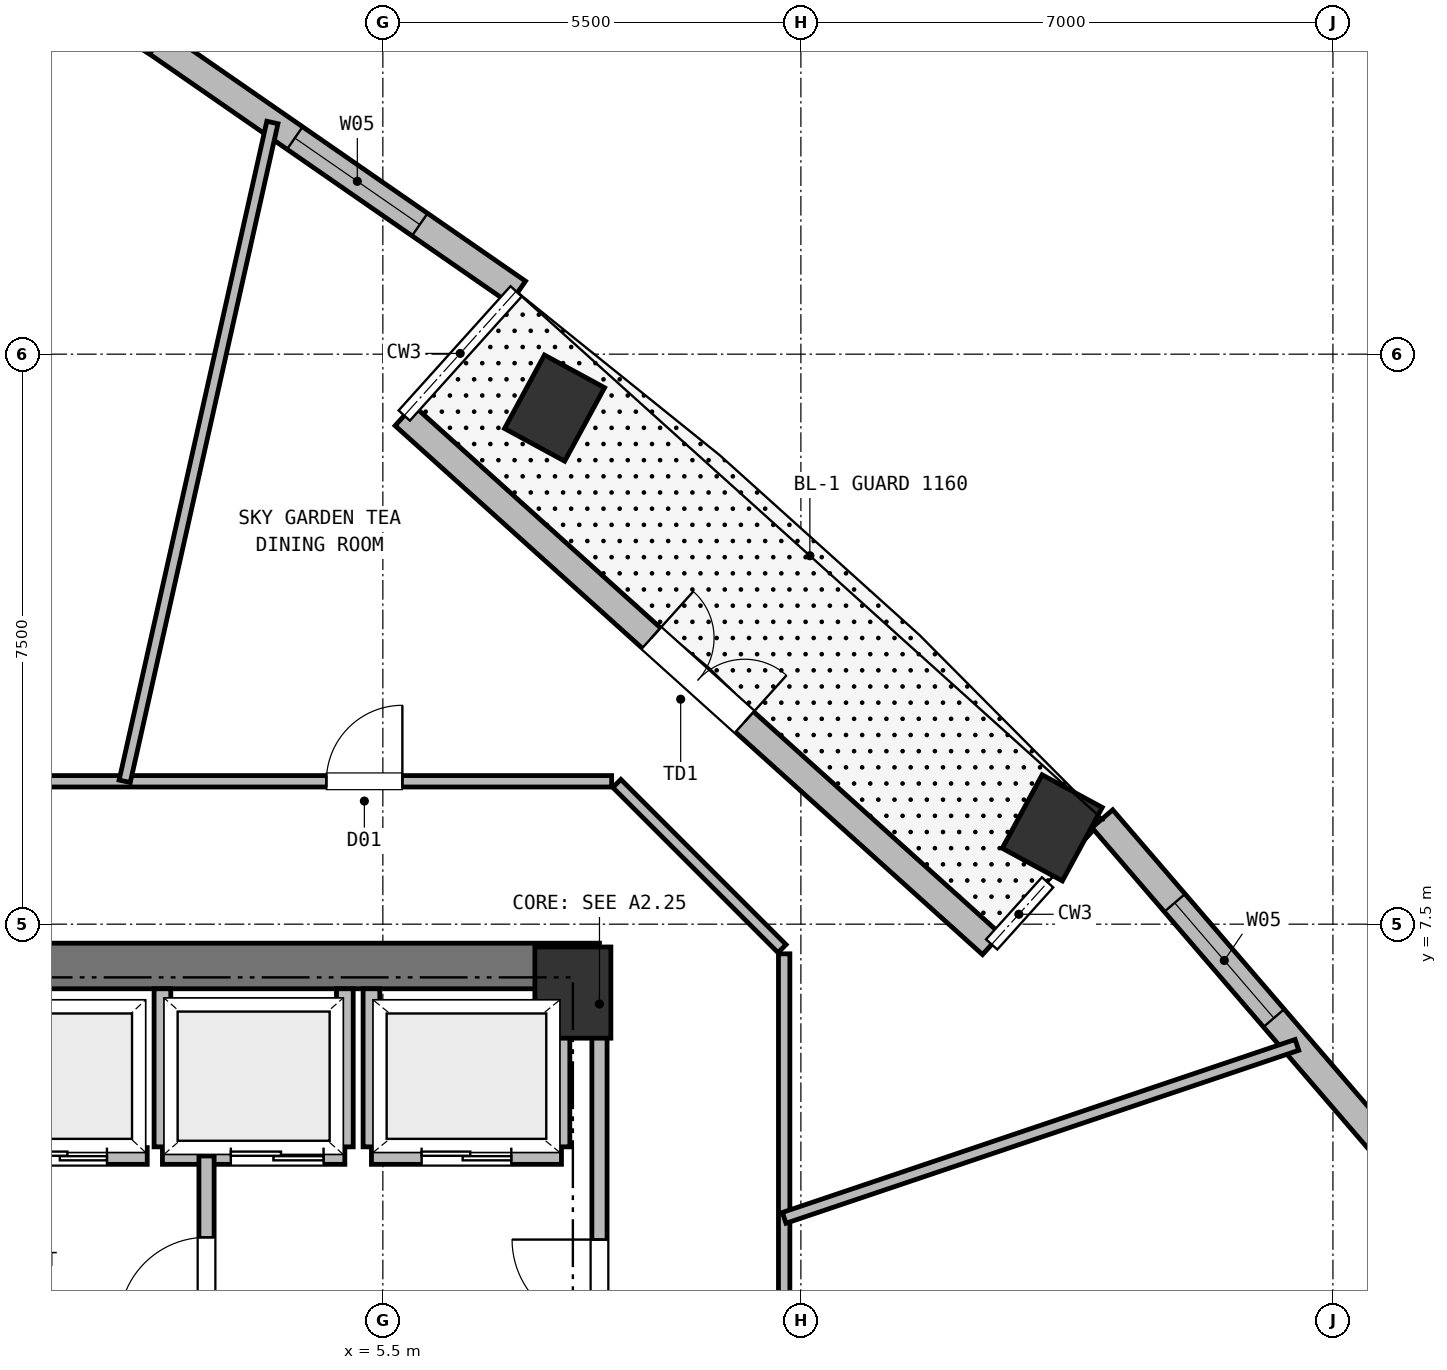
"""IFC4 building model, lengths in metres.
Left out: names, types, materials, properties, quantities, classifications, styles, units other than length and angle.
Written with IfcOpenShell. Run it as: python <this file> out.ifc"""

import sys

from ifc_helpers import new_model, si_unit, direction, frame, frame_2d, origin, origin_2d, place, context, subcontext, project, spatial, rectangle, extrude, element, fill, save


model = new_model("IFC4")
c1 = context("Model", 3, precision=1e-05, world=origin(), true_north=direction((0.0, 1.0)))
c2 = subcontext(c1, "Body", "Model", "MODEL_VIEW")
j1 = project(units=[si_unit("LENGTHUNIT", "METRE"), si_unit("PLANEANGLEUNIT", "RADIAN")], contexts=[c1])
p1 = place(None, origin())
s1 = spatial("IfcSite", under=j1, at=p1, CompositionType="ELEMENT")
p2 = place(p1, origin())
s2 = spatial("IfcBuilding", under=s1, at=p2, CompositionType="ELEMENT")
p3 = place(p2, frame((0.0, 0.0, 88.25)))
s3 = spatial("IfcBuildingStorey", under=s2, at=p3, CompositionType="ELEMENT", Elevation=88.25)
p4 = place(p3, frame((8.0, 6.6, 0.0), z_axis=(0.0, 0.0, 1.0), x_axis=(1.0, 0.0, 0.0)))
e1 = element("IfcColumn", 1, at=p4, inside=s3, PredefinedType="COLUMN", context=c2, shape_type="SweptSolid", body=[
    extrude(rectangle(XDim=1.0, YDim=1.2, at=origin_2d()), origin(), (0.0, 0.0, 1.0), 4.5),
])
p5 = place(p3, frame((-8.35, 6.95, 0.0), z_axis=(0.0, 0.0, 1.0), x_axis=(1.0, 0.0, 0.0)))
e2 = element("IfcWall", 2, at=p5, inside=s3, PredefinedType="SHEAR", context=c2, shape_type="SweptSolid", body=[
    extrude(rectangle(XDim=16.7, YDim=0.6, at=frame_2d((8.35, 0.0))), origin(), (0.0, 0.0, 1.0), 4.21),
])
for number, where, z_axis, x_axis in (
    (3, (14.307, 8.767, 0.0), (0.0, 0.0, 1.0), (-0.879, 0.477, 0.0)),
    (4, (7.759, 14.29, 0.0), (0.0, 0.0, 1.0), (-0.879, 0.477, 0.0)),
):
    element("IfcColumn", number, at=place(p3, frame(where, z_axis=z_axis, x_axis=x_axis)), inside=s3, PredefinedType="COLUMN", context=c2, shape_type="SweptSolid", body=[
        extrude(rectangle(XDim=0.9, YDim=1.1, at=origin_2d()), origin(), (0.0, 0.0, 1.0), 4.5),
    ])
p6 = place(p3, frame((5.781, 14.192, 0.0), z_axis=(0.0, 0.0, 1.0), x_axis=(0.743145885754, -0.6691294288, 0.0)))
e5 = element("IfcWall", 5, at=p6, inside=s3, PredefinedType="SOLIDWALL", context=c2, shape_type="SweptSolid", body=[
    extrude(rectangle(XDim=10.4, YDim=0.36, at=frame_2d((5.2, 0.0))), origin(), (0.0, 0.0, 1.0), 4.21),
])
p7 = place(p6, frame((4.375, 0.0, 0.0)))
e6 = element("IfcOpeningElement", 6, at=p7, cuts=e5, PredefinedType="OPENING", context=c2, shape_type="SweptSolid", body=[
    extrude(rectangle(XDim=1.65, YDim=2.25, at=frame_2d((0.825, 1.125))), frame((0.0, 0.19, 0.0), z_axis=(0.0, -1.0, 0.0), x_axis=(1.0, 0.0, 0.0)), (0.0, 0.0, 1.0), 0.38),
])
p8 = place(p3, frame((14.966, 8.887, 0.0), z_axis=(0.0, 0.0, 1.0), x_axis=(0.65220496226, -0.758042668458, 0.0)))
e7 = element("IfcWall", 7, at=p8, inside=s3, PredefinedType="SOLIDWALL", context=c2, shape_type="SweptSolid", body=[
    extrude(rectangle(XDim=5.827, YDim=0.36, at=frame_2d((2.914, 0.0))), origin(), (0.0, 0.0, 1.0), 4.21),
])
p9 = place(p8, frame((1.46, 0.0, 0.72)))
e8 = element("IfcOpeningElement", 8, at=p9, cuts=e7, PredefinedType="OPENING", context=c2, shape_type="SweptSolid", body=[
    extrude(rectangle(XDim=2.0, YDim=2.15, at=frame_2d((1.0, 1.075))), frame((0.0, 0.19, 0.0), z_axis=(0.0, -1.0, 0.0), x_axis=(1.0, 0.0, 0.0)), (0.0, 0.0, 1.0), 0.38),
])
p10 = place(p3, frame((2.484, 19.131, 0.0), z_axis=(0.0, 0.0, 1.0), x_axis=(0.82210319234, -0.56933851191, 0.0)))
e9 = element("IfcWall", 9, at=p10, inside=s3, PredefinedType="SOLIDWALL", context=c2, shape_type="SweptSolid", body=[
    extrude(rectangle(XDim=5.827, YDim=0.36, at=frame_2d((2.914, 0.0))), origin(), (0.0, 0.0, 1.0), 4.21),
])
p11 = place(p10, frame((2.26, 0.0, 0.72)))
e10 = element("IfcOpeningElement", 10, at=p11, cuts=e9, PredefinedType="OPENING", context=c2, shape_type="SweptSolid", body=[
    extrude(rectangle(XDim=2.0, YDim=2.15, at=frame_2d((1.0, 1.075))), frame((0.0, 0.19, 0.0), z_axis=(0.0, -1.0, 0.0), x_axis=(1.0, 0.0, 0.0)), (0.0, 0.0, 1.0), 0.38),
])
p12 = place(p3, frame((0.238, 20.48, 0.0), z_axis=(0.0, 0.0, 1.0), x_axis=(0.856887148216, -0.515504039967, 0.0)))
e11 = element("IfcWall", 11, at=p12, inside=s3, PredefinedType="SOLIDWALL", context=c2, shape_type="SweptSolid", body=[
    extrude(rectangle(XDim=2.67, YDim=0.36, at=frame_2d((1.335, 0.0))), origin(), (0.0, 0.0, 1.0), 4.21),
])
p13 = place(p12, frame((0.335, 0.0, 0.72)))
e12 = element("IfcOpeningElement", 12, at=p13, cuts=e11, PredefinedType="OPENING", context=c2, shape_type="SweptSolid", body=[
    extrude(rectangle(XDim=2.0, YDim=2.15, at=frame_2d((1.0, 1.075))), frame((0.0, 0.19, 0.0), z_axis=(0.0, -1.0, 0.0), x_axis=(1.0, 0.0, 0.0)), (0.0, 0.0, 1.0), 0.38),
])
p14 = place(p3, frame((5.35, 4.45, 0.0), z_axis=(0.0, 0.0, 1.0), x_axis=(1.0, 0.0, 0.0)))
e13 = element("IfcWall", 13, at=p14, inside=s3, PredefinedType="PARTITIONING", context=c2, shape_type="SweptSolid", body=[
    extrude(rectangle(XDim=2.5, YDim=0.22, at=frame_2d((1.25, 0.0))), origin(), (0.0, 0.0, 1.0), 4.21),
])
p15 = place(p14, frame((0.66, 0.0, 0.0)))
e14 = element("IfcOpeningElement", 14, at=p15, cuts=e13, PredefinedType="OPENING", context=c2, shape_type="SweptSolid", body=[
    extrude(rectangle(XDim=1.18, YDim=2.15, at=frame_2d((0.59, 1.075))), frame((0.0, 0.12, 0.0), z_axis=(0.0, -1.0, 0.0), x_axis=(1.0, 0.0, 0.0)), (0.0, 0.0, 1.0), 0.24),
])
p16 = place(p3, frame((5.35, 4.57, 0.0), z_axis=(0.0, 0.0, 1.0), x_axis=(0.0, 1.0, 0.0)))
e15 = element("IfcWall", 15, at=p16, inside=s3, PredefinedType="PARTITIONING", context=c2, shape_type="SweptSolid", body=[
    extrude(rectangle(XDim=2.08, YDim=0.22, at=frame_2d((1.04, 0.0))), origin(), (0.0, 0.0, 1.0), 4.21),
])
p17 = place(p3, frame((7.85, 4.57, 0.0), z_axis=(0.0, 0.0, 1.0), x_axis=(0.0, 1.0, 0.0)))
e16 = element("IfcWall", 16, at=p17, inside=s3, PredefinedType="PARTITIONING", context=c2, shape_type="SweptSolid", body=[
    extrude(rectangle(XDim=2.08, YDim=0.22, at=frame_2d((1.04, 0.0))), origin(), (0.0, 0.0, 1.0), 3.83),
])
p18 = place(p3, frame((2.6, 4.45, 0.0), z_axis=(0.0, 0.0, 1.0), x_axis=(1.0, 0.0, 0.0)))
e17 = element("IfcWall", 17, at=p18, inside=s3, PredefinedType="PARTITIONING", context=c2, shape_type="SweptSolid", body=[
    extrude(rectangle(XDim=2.4, YDim=0.22, at=frame_2d((1.2, 0.0))), origin(), (0.0, 0.0, 1.0), 4.21),
])
p19 = place(p18, frame((0.9, 0.0, 0.0)))
e18 = element("IfcOpeningElement", 18, at=p19, cuts=e17, PredefinedType="OPENING", context=c2, shape_type="SweptSolid", body=[
    extrude(rectangle(XDim=1.22, YDim=2.15, at=frame_2d((0.61, 1.075))), frame((0.0, 0.12, 0.0), z_axis=(0.0, -1.0, 0.0), x_axis=(1.0, 0.0, 0.0)), (0.0, 0.0, 1.0), 0.24),
])
for number, where, z_axis, x_axis in (
    (19, (2.6, 4.57, 0.0), (0.0, 0.0, 1.0), (0.0, 1.0, 0.0)),
    (20, (5.0, 4.57, 0.0), (0.0, 0.0, 1.0), (0.0, 1.0, 0.0)),
):
    element("IfcWall", number, at=place(p3, frame(where, z_axis=z_axis, x_axis=x_axis)), inside=s3, PredefinedType="PARTITIONING", context=c2, shape_type="SweptSolid", body=[
        extrude(rectangle(XDim=2.08, YDim=0.22, at=frame_2d((1.04, 0.0))), origin(), (0.0, 0.0, 1.0), 4.21),
    ])
p20 = place(p3, frame((0.2, 4.45, 0.0), z_axis=(0.0, 0.0, 1.0), x_axis=(1.0, 0.0, 0.0)))
e21 = element("IfcWall", 21, at=p20, inside=s3, PredefinedType="PARTITIONING", context=c2, shape_type="SweptSolid", body=[
    extrude(rectangle(XDim=2.2, YDim=0.22, at=frame_2d((1.1, 0.0))), origin(), (0.0, 0.0, 1.0), 4.21),
])
p21 = place(p20, frame((0.53, 0.0, 0.0)))
e22 = element("IfcOpeningElement", 22, at=p21, cuts=e21, PredefinedType="OPENING", context=c2, shape_type="SweptSolid", body=[
    extrude(rectangle(XDim=1.14, YDim=2.15, at=frame_2d((0.57, 1.075))), frame((0.0, 0.12, 0.0), z_axis=(0.0, -1.0, 0.0), x_axis=(1.0, 0.0, 0.0)), (0.0, 0.0, 1.0), 0.24),
])
p22 = place(p3, frame((3.18, 1.15, 0.0), z_axis=(0.0, 0.0, 1.0), x_axis=(0.0, 1.0, 0.0)))
e23 = element("IfcWall", 23, at=p22, inside=s3, PredefinedType="PARTITIONING", context=c2, shape_type="SweptSolid", body=[
    extrude(rectangle(XDim=3.3, YDim=0.2, at=frame_2d((1.65, 0.0))), origin(), (0.0, 0.0, 1.0), 4.21),
])
p23 = place(p22, frame((1.08, 0.0, 0.0)))
e24 = element("IfcOpeningElement", 24, at=p23, cuts=e23, PredefinedType="OPENING", context=c2, shape_type="SweptSolid", body=[
    extrude(rectangle(XDim=1.15, YDim=2.15, at=frame_2d((0.575, 1.075))), frame((0.0, 0.11, 0.0), z_axis=(0.0, -1.0, 0.0), x_axis=(1.0, 0.0, 0.0)), (0.0, 0.0, 1.0), 0.22),
])
p24 = place(p3, frame((8.35, 1.25, 0.0), z_axis=(0.0, 0.0, 1.0), x_axis=(0.0, 1.0, 0.0)))
e25 = element("IfcWall", 25, at=p24, inside=s3, PredefinedType="PARTITIONING", context=c2, shape_type="SweptSolid", body=[
    extrude(rectangle(XDim=5.3, YDim=0.2, at=frame_2d((2.65, 0.0))), origin(), (0.0, 0.0, 1.0), 4.21),
])
p25 = place(p24, frame((0.95, 0.0, 0.0)))
e26 = element("IfcOpeningElement", 26, at=p25, cuts=e25, PredefinedType="OPENING", context=c2, shape_type="SweptSolid", body=[
    extrude(rectangle(XDim=1.15, YDim=2.15, at=frame_2d((0.575, 1.075))), frame((0.0, 0.11, 0.0), z_axis=(0.0, -1.0, 0.0), x_axis=(1.0, 0.0, 0.0)), (0.0, 0.0, 1.0), 0.22),
])
p26 = place(p3, frame((10.78, 7.11, 0.0), z_axis=(0.0, 0.0, 1.0), x_axis=(0.0, -1.0, 0.0)))
e27 = element("IfcWall", 27, at=p26, inside=s3, PredefinedType="PARTITIONING", context=c2, shape_type="SweptSolid", body=[
    extrude(rectangle(XDim=14.22, YDim=0.15, at=frame_2d((7.11, 0.0))), origin(), (0.0, 0.0, 1.0), 4.21),
])
p27 = place(p26, frame((8.292, 0.0, 0.0)))
e28 = element("IfcOpeningElement", 28, at=p27, cuts=e27, PredefinedType="OPENING", context=c2, shape_type="SweptSolid", body=[
    extrude(rectangle(XDim=1.0, YDim=2.15, at=frame_2d((0.5, 1.075))), frame((0.0, 0.085, 0.0), z_axis=(0.0, -1.0, 0.0), x_axis=(1.0, 0.0, 0.0)), (0.0, 0.0, 1.0), 0.17),
])
p28 = place(p3, frame((8.578, 9.352, 0.0), z_axis=(0.0, 0.0, 1.0), x_axis=(0.707067066127, -0.707146494016, 0.0)))
e29 = element("IfcWall", 29, at=p28, inside=s3, PredefinedType="PARTITIONING", context=c2, shape_type="SweptSolid", body=[
    extrude(rectangle(XDim=3.074, YDim=0.15, at=frame_2d((1.537, 0.0))), origin(), (0.0, 0.0, 1.0), 4.21),
])
p29 = place(p3, frame((-8.51, 9.38, 0.0), z_axis=(0.0, 0.0, 1.0), x_axis=(1.0, 0.0, 0.0)))
e30 = element("IfcWall", 30, at=p29, inside=s3, PredefinedType="PARTITIONING", context=c2, shape_type="SweptSolid", body=[
    extrude(rectangle(XDim=17.02, YDim=0.15, at=frame_2d((8.51, 0.0))), origin(), (0.0, 0.0, 1.0), 4.21),
])
p30 = place(p29, frame((13.267, 0.0, 0.0)))
e31 = element("IfcOpeningElement", 31, at=p30, cuts=e30, PredefinedType="OPENING", context=c2, shape_type="SweptSolid", body=[
    extrude(rectangle(XDim=1.0, YDim=2.15, at=frame_2d((0.5, 1.075))), frame((0.0, 0.085, 0.0), z_axis=(0.0, -1.0, 0.0), x_axis=(1.0, 0.0, 0.0)), (0.0, 0.0, 1.0), 0.17),
])
p31 = place(p29, frame((4.948, 0.0, 0.0)))
e32 = element("IfcOpeningElement", 32, at=p31, cuts=e30, PredefinedType="OPENING", context=c2, shape_type="SweptSolid", body=[
    extrude(rectangle(XDim=1.0, YDim=2.15, at=frame_2d((0.5, 1.075))), frame((0.0, 0.085, 0.0), z_axis=(0.0, -1.0, 0.0), x_axis=(1.0, 0.0, 0.0)), (0.0, 0.0, 1.0), 0.17),
])
p32 = place(p3, frame((10.78, 3.636, 0.0), z_axis=(0.0, 0.0, 1.0), x_axis=(0.947556026785, 0.319589699621, 0.0)))
e33 = element("IfcWall", 33, at=p32, inside=s3, PredefinedType="PARTITIONING", context=c2, shape_type="SweptSolid", body=[
    extrude(rectangle(XDim=7.12, YDim=0.15, at=frame_2d((3.56, 0.0))), origin(), (0.0, 0.0, 1.0), 4.21),
])
p33 = place(p3, frame((2.103, 9.38, 0.0), z_axis=(0.0, 0.0, 1.0), x_axis=(0.218783642084, 0.975773394778, 0.0)))
e34 = element("IfcWall", 34, at=p33, inside=s3, PredefinedType="PARTITIONING", context=c2, shape_type="SweptSolid", body=[
    extrude(rectangle(XDim=8.884, YDim=0.15, at=frame_2d((4.442, 0.0))), origin(), (0.0, 0.0, 1.0), 4.21),
])
p34 = place(p7, origin())
e35 = element("IfcDoor", 35, at=p34, inside=s3, OperationType="DOUBLE_DOOR_SINGLE_SWING", PredefinedType="DOOR", context=c2, shape_type="SweptSolid", body=[
    extrude(rectangle(XDim=1.65, YDim=2.25, at=frame_2d((0.825, 1.125))), frame((0.0, 0.025, 0.0), z_axis=(0.0, -1.0, 0.0), x_axis=(1.0, 0.0, 0.0)), (0.0, 0.0, 1.0), 0.05),
])
fill(e6, e35)
p35 = place(p9, origin())
e36 = element("IfcWindow", 36, at=p35, inside=s3, PartitioningType="SINGLE_PANEL", PredefinedType="WINDOW", context=c2, shape_type="SweptSolid", body=[
    extrude(rectangle(XDim=2.0, YDim=2.15, at=frame_2d((1.0, 1.075))), frame((0.0, 0.03, 0.0), z_axis=(0.0, -1.0, 0.0), x_axis=(1.0, 0.0, 0.0)), (0.0, 0.0, 1.0), 0.06),
])
fill(e8, e36)
p36 = place(p11, origin())
e37 = element("IfcWindow", 37, at=p36, inside=s3, PartitioningType="SINGLE_PANEL", PredefinedType="WINDOW", context=c2, shape_type="SweptSolid", body=[
    extrude(rectangle(XDim=2.0, YDim=2.15, at=frame_2d((1.0, 1.075))), frame((0.0, 0.03, 0.0), z_axis=(0.0, -1.0, 0.0), x_axis=(1.0, 0.0, 0.0)), (0.0, 0.0, 1.0), 0.06),
])
fill(e10, e37)
p37 = place(p15, origin())
e38 = element("IfcDoor", 38, at=p37, inside=s3, OperationType="DOUBLE_DOOR_SLIDING", PredefinedType="DOOR", context=c2, shape_type="SweptSolid", body=[
    extrude(rectangle(XDim=1.18, YDim=2.15, at=frame_2d((0.59, 1.075))), frame((0.0, 0.025, 0.0), z_axis=(0.0, -1.0, 0.0), x_axis=(1.0, 0.0, 0.0)), (0.0, 0.0, 1.0), 0.05),
])
fill(e14, e38)
p38 = place(p19, origin())
e39 = element("IfcDoor", 39, at=p38, inside=s3, OperationType="DOUBLE_DOOR_SLIDING", PredefinedType="DOOR", context=c2, shape_type="SweptSolid", body=[
    extrude(rectangle(XDim=1.22, YDim=2.15, at=frame_2d((0.61, 1.075))), frame((0.0, 0.025, 0.0), z_axis=(0.0, -1.0, 0.0), x_axis=(1.0, 0.0, 0.0)), (0.0, 0.0, 1.0), 0.05),
])
fill(e18, e39)
p39 = place(p21, origin())
e40 = element("IfcDoor", 40, at=p39, inside=s3, OperationType="DOUBLE_DOOR_SLIDING", PredefinedType="DOOR", context=c2, shape_type="SweptSolid", body=[
    extrude(rectangle(XDim=1.14, YDim=2.15, at=frame_2d((0.57, 1.075))), frame((0.0, 0.025, 0.0), z_axis=(0.0, -1.0, 0.0), x_axis=(1.0, 0.0, 0.0)), (0.0, 0.0, 1.0), 0.05),
])
fill(e22, e40)
p40 = place(p23, origin())
e41 = element("IfcDoor", 41, at=p40, inside=s3, OperationType="SINGLE_SWING_LEFT", PredefinedType="DOOR", context=c2, shape_type="SweptSolid", body=[
    extrude(rectangle(XDim=1.15, YDim=2.15, at=frame_2d((0.575, 1.075))), frame((0.0, 0.025, 0.0), z_axis=(0.0, -1.0, 0.0), x_axis=(1.0, 0.0, 0.0)), (0.0, 0.0, 1.0), 0.05),
])
fill(e24, e41)
p41 = place(p25, origin())
e42 = element("IfcDoor", 42, at=p41, inside=s3, OperationType="SINGLE_SWING_RIGHT", PredefinedType="DOOR", context=c2, shape_type="SweptSolid", body=[
    extrude(rectangle(XDim=1.15, YDim=2.15, at=frame_2d((0.575, 1.075))), frame((0.0, 0.025, 0.0), z_axis=(0.0, -1.0, 0.0), x_axis=(1.0, 0.0, 0.0)), (0.0, 0.0, 1.0), 0.05),
])
fill(e26, e42)
p42 = place(p30, origin())
e43 = element("IfcDoor", 43, at=p42, inside=s3, OperationType="SINGLE_SWING_RIGHT", PredefinedType="DOOR", context=c2, shape_type="SweptSolid", body=[
    extrude(rectangle(XDim=1.0, YDim=2.15, at=frame_2d((0.5, 1.075))), frame((0.0, 0.025, 0.0), z_axis=(0.0, -1.0, 0.0), x_axis=(1.0, 0.0, 0.0)), (0.0, 0.0, 1.0), 0.05),
])
fill(e31, e43)
save(model, sys.argv[1])
